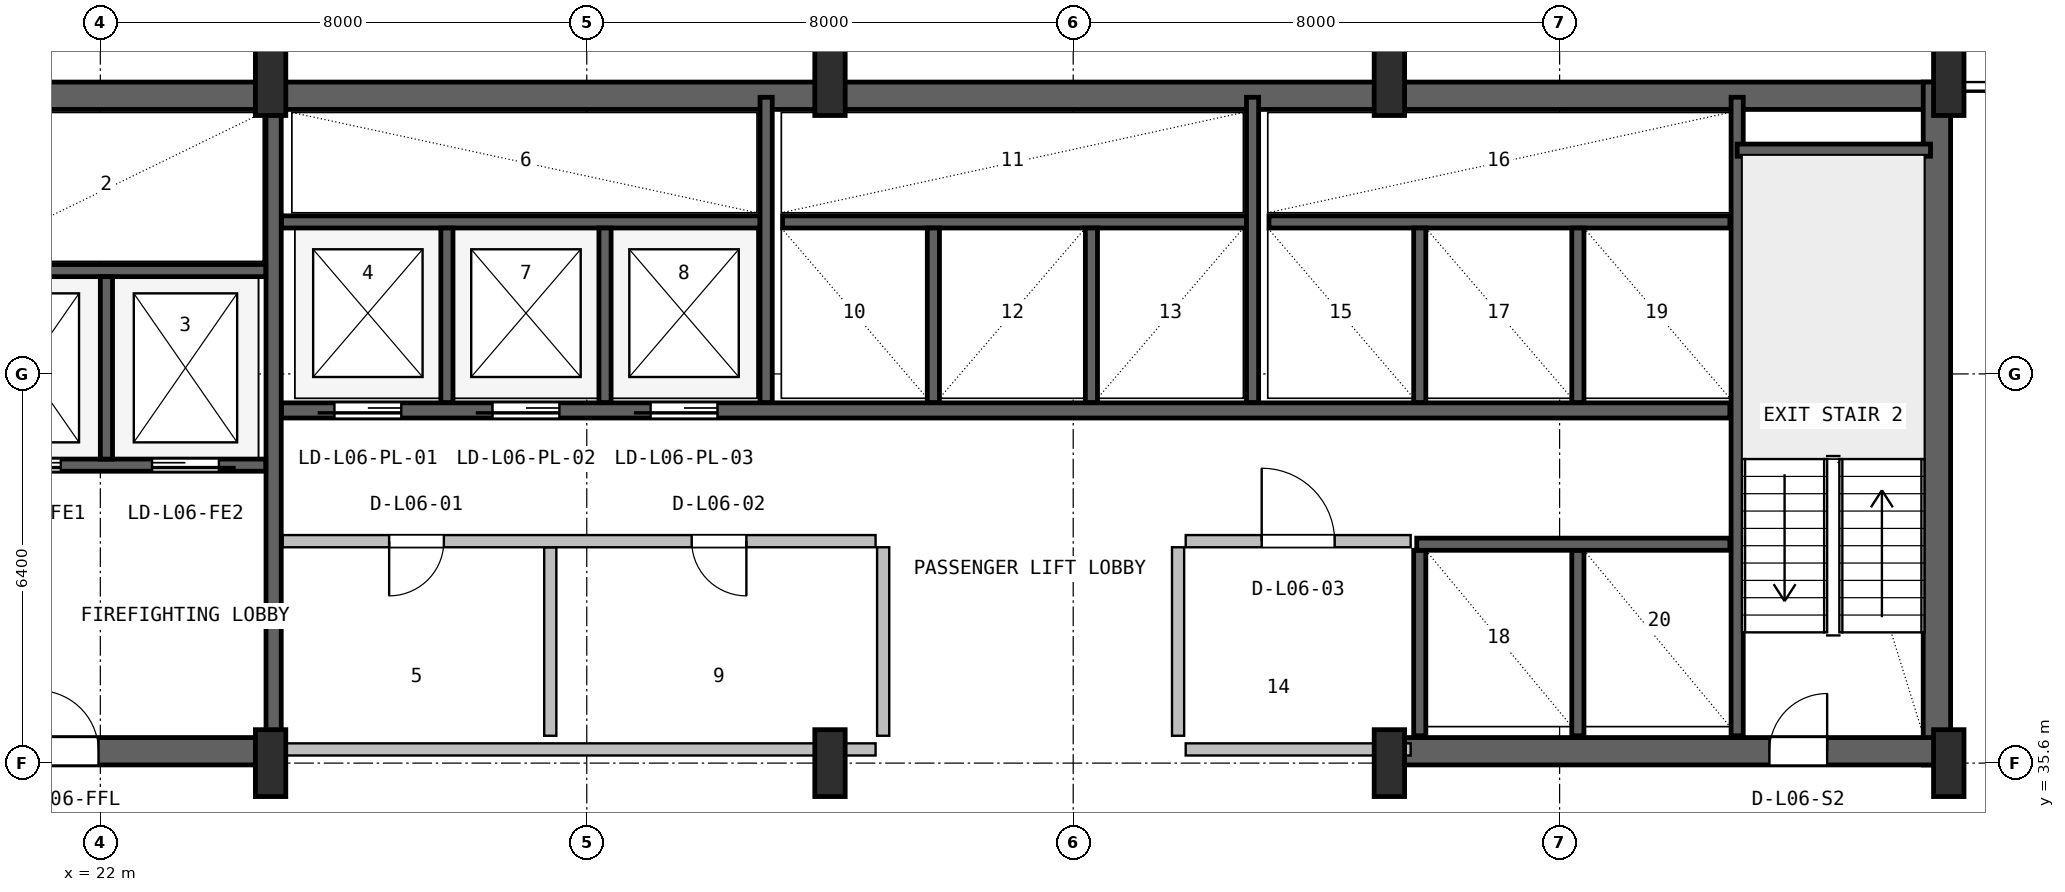
"""IFC4 building model, lengths in metres.
Left out: names, types, materials, properties, quantities, classifications, styles, units other than length and angle.
Written with IfcOpenShell. Run it as: python <this file> out.ifc"""

import sys

from ifc_helpers import new_model, si_unit, direction, frame, frame_2d, origin, origin_2d, place, context, subcontext, project, spatial, rectangle, i_section, extrude, source, transform, mapped, element, fill, save


model = new_model("IFC4")
c1 = context("Model", 3, precision=1e-05, world=origin(), true_north=direction((0.0, 1.0)))
c2 = subcontext(c1, "Body", "Model", "MODEL_VIEW")
j1 = project(units=[si_unit("LENGTHUNIT", "METRE"), si_unit("PLANEANGLEUNIT", "RADIAN")], contexts=[c1])
p1 = place(None, origin())
s1 = spatial("IfcSite", under=j1, at=p1, CompositionType="ELEMENT")
p2 = place(p1, origin())
s2 = spatial("IfcBuilding", under=s1, at=p2, CompositionType="ELEMENT")
p3 = place(p2, frame((0.0, 0.0, 31.5)))
s3 = spatial("IfcBuildingStorey", under=s2, at=p3, CompositionType="ELEMENT", Elevation=31.5)
p4 = place(p3, frame((15.6, 46.575, 0.0), z_axis=(0.0, 0.0, 1.0), x_axis=(1.0, 0.0, 0.0)))
e1 = element("IfcWall", 1, at=p4, inside=s3, PredefinedType="SHEAR", context=c2, shape_type="SweptSolid", body=[
    extrude(rectangle(XDim=36.8, YDim=0.45, at=frame_2d((18.4, 0.0))), origin(), (0.0, 0.0, 1.0), 3.65),
])
p5 = place(p3, frame((52.205, 35.57, 0.0), z_axis=(0.0, 0.0, 1.0), x_axis=(0.0, 1.0, 0.0)))
e2 = element("IfcWall", 2, at=p5, inside=s3, PredefinedType="SHEAR", context=c2, shape_type="SweptSolid", body=[
    extrude(rectangle(XDim=11.23, YDim=0.45, at=frame_2d((5.615, 0.0))), origin(), (0.0, 0.0, 1.0), 3.65),
])
p6 = place(p3, frame((15.57, 35.795, 0.0), z_axis=(0.0, 0.0, 1.0), x_axis=(1.0, 0.0, 0.0)))
e3 = element("IfcWall", 3, at=p6, inside=s3, PredefinedType="SHEAR", context=c2, shape_type="SweptSolid", body=[
    extrude(rectangle(XDim=9.23, YDim=0.45, at=frame_2d((4.615, 0.0))), origin(), (0.0, 0.0, 1.0), 3.65),
])
p7 = place(p6, frame((5.4, 0.0, 0.0)))
e4 = element("IfcOpeningElement", 4, at=p7, cuts=e3, PredefinedType="OPENING", context=c2, shape_type="SweptSolid", body=[
    extrude(rectangle(XDim=1.0, YDim=2.1, at=frame_2d((0.5, 1.05))), frame((0.0, 0.235, 0.0), z_axis=(0.0, -1.0, 0.0), x_axis=(1.0, 0.0, 0.0)), (0.0, 0.0, 1.0), 0.47),
])
p8 = place(p3, frame((43.2, 35.795, 0.0), z_axis=(0.0, 0.0, 1.0), x_axis=(1.0, 0.0, 0.0)))
e5 = element("IfcWall", 5, at=p8, inside=s3, PredefinedType="SHEAR", context=c2, shape_type="SweptSolid", body=[
    extrude(rectangle(XDim=9.23, YDim=0.45, at=frame_2d((4.615, 0.0))), origin(), (0.0, 0.0, 1.0), 3.65),
])
p9 = place(p8, frame((6.25, 0.0, 0.0)))
e6 = element("IfcOpeningElement", 6, at=p9, cuts=e5, PredefinedType="OPENING", context=c2, shape_type="SweptSolid", body=[
    extrude(rectangle(XDim=0.95, YDim=2.1, at=frame_2d((0.475, 1.05))), frame((0.0, 0.235, 0.0), z_axis=(0.0, -1.0, 0.0), x_axis=(1.0, 0.0, 0.0)), (0.0, 0.0, 1.0), 0.47),
])
m1 = source(origin(), c2, "Body", "SweptSolid", [
    extrude(i_section(OverallWidth=0.5, OverallDepth=1.1, WebThickness=0.018, FlangeThickness=0.032, FilletRadius=0.018, at=origin_2d()), origin(), (0.0, 0.0, 1.0), 3.9),
])
for number, where, z_axis, x_axis in (
    (7, (24.8, 35.6, 0.0), (0.0, 0.0, 1.0), (1.0, 0.0, 0.0)),
    (8, (24.8, 46.8, 0.0), (0.0, 0.0, 1.0), (1.0, 0.0, 0.0)),
    (9, (34.0, 35.6, 0.0), (0.0, 0.0, 1.0), (1.0, 0.0, 0.0)),
    (10, (34.0, 46.8, 0.0), (0.0, 0.0, 1.0), (1.0, 0.0, 0.0)),
    (11, (43.2, 35.6, 0.0), (0.0, 0.0, 1.0), (1.0, 0.0, 0.0)),
    (12, (43.2, 46.8, 0.0), (0.0, 0.0, 1.0), (1.0, 0.0, 0.0)),
    (13, (52.4, 35.6, 0.0), (0.0, 0.0, 1.0), (1.0, 0.0, 0.0)),
    (14, (52.4, 46.8, 0.0), (0.0, 0.0, 1.0), (1.0, 0.0, 0.0)),
):
    element("IfcColumn", number, at=place(p3, frame(where, z_axis=z_axis, x_axis=x_axis)), inside=s3, PredefinedType="COLUMN", context=c2, shape_type="MappedRepresentation", body=[
        mapped(m1, transform((0.0, 0.0, 0.0), x_axis=(1.0, 0.0, 0.0), y_axis=(0.0, 1.0, 0.0), z_axis=(0.0, 0.0, 1.0), scale=1.0)),
    ])
p10 = place(p3, frame((24.85, 36.05, 0.0), z_axis=(0.0, 0.0, 1.0), x_axis=(0.0, 1.0, 0.0)))
e15 = element("IfcWall", 15, at=p10, inside=s3, PredefinedType="SHEAR", context=c2, shape_type="SweptSolid", body=[
    extrude(rectangle(XDim=10.45, YDim=0.25, at=frame_2d((5.225, 0.0))), origin(), (0.0, 0.0, 1.0), 3.65),
])
p11 = place(p3, frame((19.2, 40.5, 0.0), z_axis=(0.0, 0.0, 1.0), x_axis=(1.0, 0.0, 0.0)))
e16 = element("IfcWall", 16, at=p11, inside=s3, PredefinedType="SHEAR", context=c2, shape_type="SweptSolid", body=[
    extrude(rectangle(XDim=5.52, YDim=0.2, at=frame_2d((2.76, 0.0))), origin(), (0.0, 0.0, 1.0), 3.65),
])
p12 = place(p11, frame((1.05, 0.0, 0.0)))
e17 = element("IfcOpeningElement", 17, at=p12, cuts=e16, PredefinedType="OPENING", context=c2, shape_type="SweptSolid", body=[
    extrude(rectangle(XDim=1.1, YDim=2.18, at=frame_2d((0.55, 1.09))), frame((0.0, 0.11, 0.0), z_axis=(0.0, -1.0, 0.0), x_axis=(1.0, 0.0, 0.0)), (0.0, 0.0, 1.0), 0.22),
])
p13 = place(p11, frame((3.65, 0.0, 0.0)))
e18 = element("IfcOpeningElement", 18, at=p13, cuts=e16, PredefinedType="OPENING", context=c2, shape_type="SweptSolid", body=[
    extrude(rectangle(XDim=1.1, YDim=2.18, at=frame_2d((0.55, 1.09))), frame((0.0, 0.11, 0.0), z_axis=(0.0, -1.0, 0.0), x_axis=(1.0, 0.0, 0.0)), (0.0, 0.0, 1.0), 0.22),
])
p14 = place(p3, frame((19.2, 43.7, 0.0), z_axis=(0.0, 0.0, 1.0), x_axis=(1.0, 0.0, 0.0)))
e19 = element("IfcWall", 19, at=p14, inside=s3, PredefinedType="SHEAR", context=c2, shape_type="SweptSolid", body=[
    extrude(rectangle(XDim=5.52, YDim=0.2, at=frame_2d((2.76, 0.0))), origin(), (0.0, 0.0, 1.0), 3.65),
])
p15 = place(p3, frame((22.1, 40.6, 0.0), z_axis=(0.0, 0.0, 1.0), x_axis=(0.0, 1.0, 0.0)))
e20 = element("IfcWall", 20, at=p15, inside=s3, PredefinedType="SHEAR", context=c2, shape_type="SweptSolid", body=[
    extrude(rectangle(XDim=3.0, YDim=0.2, at=frame_2d((1.5, 0.0))), origin(), (0.0, 0.0, 1.0), 3.65),
])
p16 = place(p3, frame((48.92, 36.05, 0.0), z_axis=(0.0, 0.0, 1.0), x_axis=(0.0, 1.0, 0.0)))
e21 = element("IfcWall", 21, at=p16, inside=s3, PredefinedType="SHEAR", context=c2, shape_type="SweptSolid", body=[
    extrude(rectangle(XDim=10.5, YDim=0.2, at=frame_2d((5.25, 0.0))), origin(), (0.0, 0.0, 1.0), 3.65),
])
p17 = place(p3, frame((48.92, 45.68, 0.0), z_axis=(0.0, 0.0, 1.0), x_axis=(1.0, 0.0, 0.0)))
e22 = element("IfcWall", 22, at=p17, inside=s3, PredefinedType="SHEAR", context=c2, shape_type="SweptSolid", body=[
    extrude(rectangle(XDim=3.18, YDim=0.2, at=frame_2d((1.59, 0.0))), origin(), (0.0, 0.0, 1.0), 3.65),
])
p18 = place(p3, frame((24.98, 41.4, 0.0), z_axis=(0.0, 0.0, 1.0), x_axis=(1.0, 0.0, 0.0)))
e23 = element("IfcWall", 23, at=p18, inside=s3, PredefinedType="SHEAR", context=c2, shape_type="SweptSolid", body=[
    extrude(rectangle(XDim=23.82, YDim=0.25, at=frame_2d((11.91, 0.0))), origin(), (0.0, 0.0, 1.0), 3.65),
])
p19 = place(p18, frame((0.87, 0.0, 0.0)))
e24 = element("IfcOpeningElement", 24, at=p19, cuts=e23, PredefinedType="OPENING", context=c2, shape_type="SweptSolid", body=[
    extrude(rectangle(XDim=1.1, YDim=2.18, at=frame_2d((0.55, 1.09))), frame((0.0, 0.135, 0.0), z_axis=(0.0, -1.0, 0.0), x_axis=(1.0, 0.0, 0.0)), (0.0, 0.0, 1.0), 0.27),
])
p20 = place(p18, frame((3.47, 0.0, 0.0)))
e25 = element("IfcOpeningElement", 25, at=p20, cuts=e23, PredefinedType="OPENING", context=c2, shape_type="SweptSolid", body=[
    extrude(rectangle(XDim=1.1, YDim=2.18, at=frame_2d((0.55, 1.09))), frame((0.0, 0.135, 0.0), z_axis=(0.0, -1.0, 0.0), x_axis=(1.0, 0.0, 0.0)), (0.0, 0.0, 1.0), 0.27),
])
p21 = place(p18, frame((6.07, 0.0, 0.0)))
e26 = element("IfcOpeningElement", 26, at=p21, cuts=e23, PredefinedType="OPENING", context=c2, shape_type="SweptSolid", body=[
    extrude(rectangle(XDim=1.1, YDim=2.18, at=frame_2d((0.55, 1.09))), frame((0.0, 0.135, 0.0), z_axis=(0.0, -1.0, 0.0), x_axis=(1.0, 0.0, 0.0)), (0.0, 0.0, 1.0), 0.27),
])
p22 = place(p3, frame((24.98, 44.5, 0.0), z_axis=(0.0, 0.0, 1.0), x_axis=(1.0, 0.0, 0.0)))
e27 = element("IfcWall", 27, at=p22, inside=s3, PredefinedType="SHEAR", context=c2, shape_type="SweptSolid", body=[
    extrude(rectangle(XDim=7.87, YDim=0.2, at=frame_2d((3.935, 0.0))), origin(), (0.0, 0.0, 1.0), 3.65),
])
for number, where, z_axis, x_axis in (
    (28, (27.7, 41.53, 0.0), (0.0, 0.0, 1.0), (0.0, 1.0, 0.0)),
    (29, (30.3, 41.53, 0.0), (0.0, 0.0, 1.0), (0.0, 1.0, 0.0)),
):
    element("IfcWall", number, at=place(p3, frame(where, z_axis=z_axis, x_axis=x_axis)), inside=s3, PredefinedType="SHEAR", context=c2, shape_type="SweptSolid", body=[
        extrude(rectangle(XDim=2.87, YDim=0.2, at=frame_2d((1.435, 0.0))), origin(), (0.0, 0.0, 1.0), 3.65),
    ])
p23 = place(p3, frame((32.95, 41.53, 0.0), z_axis=(0.0, 0.0, 1.0), x_axis=(0.0, 1.0, 0.0)))
e30 = element("IfcWall", 30, at=p23, inside=s3, PredefinedType="SHEAR", context=c2, shape_type="SweptSolid", body=[
    extrude(rectangle(XDim=5.02, YDim=0.2, at=frame_2d((2.51, 0.0))), origin(), (0.0, 0.0, 1.0), 3.65),
])
p24 = place(p3, frame((33.22, 44.5, 0.0), z_axis=(0.0, 0.0, 1.0), x_axis=(1.0, 0.0, 0.0)))
e31 = element("IfcWall", 31, at=p24, inside=s3, PredefinedType="SHEAR", context=c2, shape_type="SweptSolid", body=[
    extrude(rectangle(XDim=7.63, YDim=0.2, at=frame_2d((3.815, 0.0))), origin(), (0.0, 0.0, 1.0), 3.65),
])
for number, where, z_axis, x_axis in (
    (32, (35.7, 41.53, 0.0), (0.0, 0.0, 1.0), (0.0, 1.0, 0.0)),
    (33, (38.3, 41.53, 0.0), (0.0, 0.0, 1.0), (0.0, 1.0, 0.0)),
):
    element("IfcWall", number, at=place(p3, frame(where, z_axis=z_axis, x_axis=x_axis)), inside=s3, PredefinedType="SHEAR", context=c2, shape_type="SweptSolid", body=[
        extrude(rectangle(XDim=2.87, YDim=0.2, at=frame_2d((1.435, 0.0))), origin(), (0.0, 0.0, 1.0), 3.65),
    ])
p25 = place(p3, frame((40.95, 41.53, 0.0), z_axis=(0.0, 0.0, 1.0), x_axis=(0.0, 1.0, 0.0)))
e34 = element("IfcWall", 34, at=p25, inside=s3, PredefinedType="SHEAR", context=c2, shape_type="SweptSolid", body=[
    extrude(rectangle(XDim=5.02, YDim=0.2, at=frame_2d((2.51, 0.0))), origin(), (0.0, 0.0, 1.0), 3.65),
])
p26 = place(p3, frame((41.22, 44.5, 0.0), z_axis=(0.0, 0.0, 1.0), x_axis=(1.0, 0.0, 0.0)))
e35 = element("IfcWall", 35, at=p26, inside=s3, PredefinedType="SHEAR", context=c2, shape_type="SweptSolid", body=[
    extrude(rectangle(XDim=7.58, YDim=0.2, at=frame_2d((3.79, 0.0))), origin(), (0.0, 0.0, 1.0), 3.65),
])
for number, where, z_axis, x_axis in (
    (36, (43.7, 41.53, 0.0), (0.0, 0.0, 1.0), (0.0, 1.0, 0.0)),
    (37, (46.3, 41.53, 0.0), (0.0, 0.0, 1.0), (0.0, 1.0, 0.0)),
):
    element("IfcWall", number, at=place(p3, frame(where, z_axis=z_axis, x_axis=x_axis)), inside=s3, PredefinedType="SHEAR", context=c2, shape_type="SweptSolid", body=[
        extrude(rectangle(XDim=2.87, YDim=0.2, at=frame_2d((1.435, 0.0))), origin(), (0.0, 0.0, 1.0), 3.65),
    ])
for number, where, z_axis, x_axis in (
    (38, (43.7, 36.05, 0.0), (0.0, 0.0, 1.0), (0.0, 1.0, 0.0)),
    (39, (46.3, 36.05, 0.0), (0.0, 0.0, 1.0), (0.0, 1.0, 0.0)),
):
    element("IfcWall", number, at=place(p3, frame(where, z_axis=z_axis, x_axis=x_axis)), inside=s3, PredefinedType="SHEAR", context=c2, shape_type="SweptSolid", body=[
        extrude(rectangle(XDim=3.05, YDim=0.2, at=frame_2d((1.525, 0.0))), origin(), (0.0, 0.0, 1.0), 3.65),
    ])
p27 = place(p3, frame((43.65, 39.2, 0.0), z_axis=(0.0, 0.0, 1.0), x_axis=(1.0, 0.0, 0.0)))
e40 = element("IfcWall", 40, at=p27, inside=s3, PredefinedType="SHEAR", context=c2, shape_type="SweptSolid", body=[
    extrude(rectangle(XDim=5.15, YDim=0.2, at=frame_2d((2.575, 0.0))), origin(), (0.0, 0.0, 1.0), 3.65),
])
p28 = place(p3, frame((25.0, 35.825, 0.0), z_axis=(0.0, 0.0, 1.0), x_axis=(1.0, 0.0, 0.0)))
e41 = element("IfcWall", 41, at=p28, inside=s3, PredefinedType="PLUMBINGWALL", context=c2, shape_type="SweptSolid", body=[
    extrude(rectangle(XDim=9.75, YDim=0.2, at=frame_2d((4.875, 0.0))), origin(), (0.0, 0.0, 1.0), 2.425),
])
p29 = place(p3, frame((29.4, 36.05, 0.0), z_axis=(0.0, 0.0, 1.0), x_axis=(0.0, 1.0, 0.0)))
e42 = element("IfcWall", 42, at=p29, inside=s3, PredefinedType="PLUMBINGWALL", context=c2, shape_type="SweptSolid", body=[
    extrude(rectangle(XDim=3.1, YDim=0.2, at=frame_2d((1.55, 0.0))), origin(), (0.0, 0.0, 1.0), 3.63),
])
p30 = place(p3, frame((25.0, 39.25, 0.0), z_axis=(0.0, 0.0, 1.0), x_axis=(1.0, 0.0, 0.0)))
e43 = element("IfcWall", 43, at=p30, inside=s3, PredefinedType="PLUMBINGWALL", context=c2, shape_type="SweptSolid", body=[
    extrude(rectangle(XDim=9.75, YDim=0.2, at=frame_2d((4.875, 0.0))), origin(), (0.0, 0.0, 1.0), 3.63),
])
p31 = place(p30, frame((1.75, 0.0, 0.0)))
e44 = element("IfcOpeningElement", 44, at=p31, cuts=e43, PredefinedType="OPENING", context=c2, shape_type="SweptSolid", body=[
    extrude(rectangle(XDim=0.9, YDim=2.06, at=frame_2d((0.45, 1.03))), frame((0.0, 0.11, 0.0), z_axis=(0.0, -1.0, 0.0), x_axis=(1.0, 0.0, 0.0)), (0.0, 0.0, 1.0), 0.22),
])
p32 = place(p30, frame((6.725, 0.0, 0.0)))
e45 = element("IfcOpeningElement", 45, at=p32, cuts=e43, PredefinedType="OPENING", context=c2, shape_type="SweptSolid", body=[
    extrude(rectangle(XDim=0.9, YDim=2.06, at=frame_2d((0.45, 1.03))), frame((0.0, 0.11, 0.0), z_axis=(0.0, -1.0, 0.0), x_axis=(1.0, 0.0, 0.0)), (0.0, 0.0, 1.0), 0.22),
])
p33 = place(p3, frame((34.875, 36.05, 0.0), z_axis=(0.0, 0.0, 1.0), x_axis=(0.0, 1.0, 0.0)))
e46 = element("IfcWall", 46, at=p33, inside=s3, PredefinedType="PLUMBINGWALL", context=c2, shape_type="SweptSolid", body=[
    extrude(rectangle(XDim=3.1, YDim=0.2, at=frame_2d((1.55, 0.0))), origin(), (0.0, 0.0, 1.0), 3.63),
])
p34 = place(p3, frame((39.85, 35.825, 0.0), z_axis=(0.0, 0.0, 1.0), x_axis=(1.0, 0.0, 0.0)))
e47 = element("IfcWall", 47, at=p34, inside=s3, PredefinedType="SOLIDWALL", context=c2, shape_type="SweptSolid", body=[
    extrude(rectangle(XDim=3.7, YDim=0.2, at=frame_2d((1.85, 0.0))), origin(), (0.0, 0.0, 1.0), 2.425),
])
p35 = place(p3, frame((39.85, 39.25, 0.0), z_axis=(0.0, 0.0, 1.0), x_axis=(1.0, 0.0, 0.0)))
e48 = element("IfcWall", 48, at=p35, inside=s3, PredefinedType="SOLIDWALL", context=c2, shape_type="SweptSolid", body=[
    extrude(rectangle(XDim=3.7, YDim=0.2, at=frame_2d((1.85, 0.0))), origin(), (0.0, 0.0, 1.0), 3.63),
])
p36 = place(p35, frame((1.25, 0.0, 0.0)))
e49 = element("IfcOpeningElement", 49, at=p36, cuts=e48, PredefinedType="OPENING", context=c2, shape_type="SweptSolid", body=[
    extrude(rectangle(XDim=1.2, YDim=2.1, at=frame_2d((0.6, 1.05))), frame((0.0, 0.11, 0.0), z_axis=(0.0, -1.0, 0.0), x_axis=(1.0, 0.0, 0.0)), (0.0, 0.0, 1.0), 0.22),
])
p37 = place(p3, frame((39.725, 36.05, 0.0), z_axis=(0.0, 0.0, 1.0), x_axis=(0.0, 1.0, 0.0)))
e50 = element("IfcWall", 50, at=p37, inside=s3, PredefinedType="SOLIDWALL", context=c2, shape_type="SweptSolid", body=[
    extrude(rectangle(XDim=3.1, YDim=0.2, at=frame_2d((1.55, 0.0))), origin(), (0.0, 0.0, 1.0), 3.63),
])
m2 = source(origin(), c2, "Body", "SweptSolid", [
    extrude(rectangle(XDim=1.0, YDim=2.1, at=frame_2d((0.5, 1.05))), frame((0.0, 0.025, 0.0), z_axis=(0.0, -1.0, 0.0), x_axis=(1.0, 0.0, 0.0)), (0.0, 0.0, 1.0), 0.05),
])
p38 = place(p7, origin())
e51 = element("IfcDoor", 51, at=p38, inside=s3, OperationType="SINGLE_SWING_LEFT", PredefinedType="DOOR", context=c2, shape_type="MappedRepresentation", body=[
    mapped(m2, transform((0.0, 0.0, 0.0), x_axis=(1.0, 0.0, 0.0), y_axis=(0.0, 1.0, 0.0), z_axis=(0.0, 0.0, 1.0), scale=1.0)),
])
fill(e4, e51)
m3 = source(origin(), c2, "Body", "SweptSolid", [
    extrude(rectangle(XDim=1.1, YDim=2.18, at=frame_2d((0.55, 1.09))), frame((0.0, 0.025, 0.0), z_axis=(0.0, -1.0, 0.0), x_axis=(1.0, 0.0, 0.0)), (0.0, 0.0, 1.0), 0.05),
])
p39 = place(p12, frame((1.1, 0.0, 0.0), z_axis=(0.0, 0.0, 1.0), x_axis=(-1.0, 0.0, 0.0)))
e52 = element("IfcDoor", 52, at=p39, inside=s3, OperationType="SLIDING_TO_LEFT", PredefinedType="DOOR", context=c2, shape_type="MappedRepresentation", body=[
    mapped(m3, transform((0.0, 0.0, 0.0), x_axis=(1.0, 0.0, 0.0), y_axis=(0.0, 1.0, 0.0), z_axis=(0.0, 0.0, 1.0), scale=1.0)),
])
fill(e17, e52)
p40 = place(p13, frame((1.1, 0.0, 0.0), z_axis=(0.0, 0.0, 1.0), x_axis=(-1.0, 0.0, 0.0)))
e53 = element("IfcDoor", 53, at=p40, inside=s3, OperationType="SLIDING_TO_RIGHT", PredefinedType="DOOR", context=c2, shape_type="MappedRepresentation", body=[
    mapped(m3, transform((0.0, 0.0, 0.0), x_axis=(1.0, 0.0, 0.0), y_axis=(0.0, 1.0, 0.0), z_axis=(0.0, 0.0, 1.0), scale=1.0)),
])
fill(e18, e53)
m4 = source(origin(), c2, "Body", "SweptSolid", [
    extrude(rectangle(XDim=0.95, YDim=2.1, at=frame_2d((0.475, 1.05))), frame((0.0, 0.025, 0.0), z_axis=(0.0, -1.0, 0.0), x_axis=(1.0, 0.0, 0.0)), (0.0, 0.0, 1.0), 0.05),
])
p41 = place(p9, origin())
e54 = element("IfcDoor", 54, at=p41, inside=s3, OperationType="SINGLE_SWING_RIGHT", PredefinedType="DOOR", context=c2, shape_type="MappedRepresentation", body=[
    mapped(m4, transform((0.0, 0.0, 0.0), x_axis=(1.0, 0.0, 0.0), y_axis=(0.0, 1.0, 0.0), z_axis=(0.0, 0.0, 1.0), scale=1.0)),
])
fill(e6, e54)
p42 = place(p19, frame((1.1, 0.0, 0.0), z_axis=(0.0, 0.0, 1.0), x_axis=(-1.0, 0.0, 0.0)))
e55 = element("IfcDoor", 55, at=p42, inside=s3, OperationType="SLIDING_TO_LEFT", PredefinedType="DOOR", context=c2, shape_type="MappedRepresentation", body=[
    mapped(m3, transform((0.0, 0.0, 0.0), x_axis=(1.0, 0.0, 0.0), y_axis=(0.0, 1.0, 0.0), z_axis=(0.0, 0.0, 1.0), scale=1.0)),
])
fill(e24, e55)
p43 = place(p20, frame((1.1, 0.0, 0.0), z_axis=(0.0, 0.0, 1.0), x_axis=(-1.0, 0.0, 0.0)))
e56 = element("IfcDoor", 56, at=p43, inside=s3, OperationType="SLIDING_TO_LEFT", PredefinedType="DOOR", context=c2, shape_type="MappedRepresentation", body=[
    mapped(m3, transform((0.0, 0.0, 0.0), x_axis=(1.0, 0.0, 0.0), y_axis=(0.0, 1.0, 0.0), z_axis=(0.0, 0.0, 1.0), scale=1.0)),
])
fill(e25, e56)
p44 = place(p21, frame((1.1, 0.0, 0.0), z_axis=(0.0, 0.0, 1.0), x_axis=(-1.0, 0.0, 0.0)))
e57 = element("IfcDoor", 57, at=p44, inside=s3, OperationType="SLIDING_TO_LEFT", PredefinedType="DOOR", context=c2, shape_type="MappedRepresentation", body=[
    mapped(m3, transform((0.0, 0.0, 0.0), x_axis=(1.0, 0.0, 0.0), y_axis=(0.0, 1.0, 0.0), z_axis=(0.0, 0.0, 1.0), scale=1.0)),
])
fill(e26, e57)
m5 = source(origin(), c2, "Body", "SweptSolid", [
    extrude(rectangle(XDim=0.9, YDim=2.06, at=frame_2d((0.45, 1.03))), frame((0.0, 0.025, 0.0), z_axis=(0.0, -1.0, 0.0), x_axis=(1.0, 0.0, 0.0)), (0.0, 0.0, 1.0), 0.05),
])
p45 = place(p31, frame((0.9, 0.0, 0.0), z_axis=(0.0, 0.0, 1.0), x_axis=(-1.0, 0.0, 0.0)))
e58 = element("IfcDoor", 58, at=p45, inside=s3, OperationType="SINGLE_SWING_LEFT", PredefinedType="DOOR", context=c2, shape_type="MappedRepresentation", body=[
    mapped(m5, transform((0.0, 0.0, 0.0), x_axis=(1.0, 0.0, 0.0), y_axis=(0.0, 1.0, 0.0), z_axis=(0.0, 0.0, 1.0), scale=1.0)),
])
fill(e44, e58)
p46 = place(p32, frame((0.9, 0.0, 0.0), z_axis=(0.0, 0.0, 1.0), x_axis=(-1.0, 0.0, 0.0)))
e59 = element("IfcDoor", 59, at=p46, inside=s3, OperationType="SINGLE_SWING_RIGHT", PredefinedType="DOOR", context=c2, shape_type="MappedRepresentation", body=[
    mapped(m5, transform((0.0, 0.0, 0.0), x_axis=(1.0, 0.0, 0.0), y_axis=(0.0, 1.0, 0.0), z_axis=(0.0, 0.0, 1.0), scale=1.0)),
])
fill(e45, e59)
m6 = source(origin(), c2, "Body", "SweptSolid", [
    extrude(rectangle(XDim=1.2, YDim=2.1, at=frame_2d((0.6, 1.05))), frame((0.0, 0.025, 0.0), z_axis=(0.0, -1.0, 0.0), x_axis=(1.0, 0.0, 0.0)), (0.0, 0.0, 1.0), 0.05),
])
p47 = place(p36, origin())
e60 = element("IfcDoor", 60, at=p47, inside=s3, OperationType="SINGLE_SWING_LEFT", PredefinedType="DOOR", context=c2, shape_type="MappedRepresentation", body=[
    mapped(m6, transform((0.0, 0.0, 0.0), x_axis=(1.0, 0.0, 0.0), y_axis=(0.0, 1.0, 0.0), z_axis=(0.0, 0.0, 1.0), scale=1.0)),
])
fill(e49, e60)
save(model, sys.argv[1])
